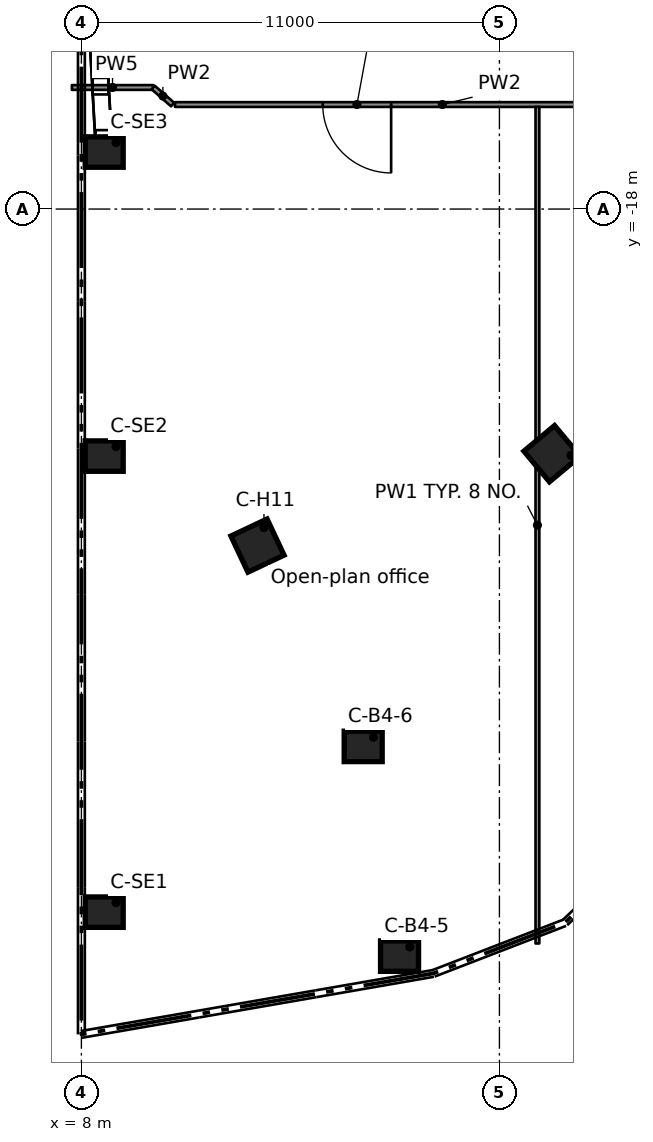
"""IFC4 building model, lengths in metres.
Left out: names, types, materials, properties, quantities, classifications, styles, units other than length and angle.
Written with IfcOpenShell. Run it as: python <this file> out.ifc"""

import sys

from ifc_helpers import new_model, si_unit, direction, frame, frame_2d, origin, origin_2d, place, context, subcontext, project, spatial, rectangle, extrude, element, fill, save


model = new_model("IFC4")
c1 = context("Model", 3, precision=1e-05, world=origin(), true_north=direction((0.0, 1.0)))
c2 = subcontext(c1, "Body", "Model", "MODEL_VIEW")
j1 = project(units=[si_unit("LENGTHUNIT", "METRE"), si_unit("PLANEANGLEUNIT", "RADIAN")], contexts=[c1])
p1 = place(None, origin())
s1 = spatial("IfcSite", under=j1, at=p1, CompositionType="ELEMENT")
p2 = place(p1, origin())
s2 = spatial("IfcBuilding", under=s1, at=p2, CompositionType="ELEMENT")
p3 = place(p2, frame((0.0, 0.0, 257.0)))
s3 = spatial("IfcBuildingStorey", under=s2, at=p3, CompositionType="ELEMENT", Elevation=257.0)
for number, where, z_axis, x_axis in (
    (1, (16.372, -37.657, 0.0), (0.0, 0.0, 1.0), (1.0, 0.0, 0.0)),
    (2, (15.415, -32.139, 0.0), (0.0, 0.0, 1.0), (1.0, 0.0, 0.0)),
):
    element("IfcColumn", number, at=place(p3, frame(where, z_axis=z_axis, x_axis=x_axis)), inside=s3, PredefinedType="COLUMN", context=c2, shape_type="SweptSolid", body=[
        extrude(rectangle(XDim=1.0, YDim=0.8, at=origin_2d()), origin(), (0.0, 0.0, 1.0), 3.5),
    ])
for number, where, z_axis, x_axis in (
    (3, (20.384, -24.437, 0.0), (0.0, 0.0, 1.0), (0.641, -0.768, 0.0)),
    (4, (12.634, -26.855, 0.0), (0.0, 0.0, 1.0), (0.426, -0.905, 0.0)),
):
    element("IfcColumn", number, at=place(p3, frame(where, z_axis=z_axis, x_axis=x_axis)), inside=s3, PredefinedType="COLUMN", context=c2, shape_type="SweptSolid", body=[
        extrude(rectangle(XDim=1.05, YDim=1.05, at=origin_2d()), origin(), (0.0, 0.0, 1.0), 3.5),
    ])
for number, where, z_axis, x_axis in (
    (5, (8.6, -36.5, 0.0), (0.0, 0.0, 1.0), (1.0, 0.0, 0.0)),
    (6, (8.6, -24.5, 0.0), (0.0, 0.0, 1.0), (1.0, 0.0, 0.0)),
    (7, (8.6, -16.5, 0.0), (0.0, 0.0, 1.0), (1.0, 0.0, 0.0)),
):
    element("IfcColumn", number, at=place(p3, frame(where, z_axis=z_axis, x_axis=x_axis)), inside=s3, PredefinedType="COLUMN", context=c2, shape_type="SweptSolid", body=[
        extrude(rectangle(XDim=1.0, YDim=0.8, at=origin_2d()), origin(), (0.0, 0.0, 1.0), 3.5),
    ])
p4 = place(p3, frame((22.189, -15.25, 0.0), z_axis=(0.0, 0.0, 1.0), x_axis=(-1.0, 0.0, 0.0)))
e8 = element("IfcWall", 8, at=p4, inside=s3, PredefinedType="PARTITIONING", context=c2, shape_type="SweptSolid", body=[
    extrude(rectangle(XDim=11.726, YDim=0.125, at=frame_2d((5.863, 0.0))), origin(), (0.0, 0.0, 1.0), 3.08),
])
p5 = place(p4, frame((6.039, 0.0, 0.0)))
e9 = element("IfcOpeningElement", 9, at=p5, cuts=e8, PredefinedType="OPENING", context=c2, shape_type="SweptSolid", body=[
    extrude(rectangle(XDim=1.8, YDim=2.1, at=frame_2d((0.9, 1.05))), frame((0.0, 0.073, 0.0), z_axis=(0.0, -1.0, 0.0), x_axis=(1.0, 0.0, 0.0)), (0.0, 0.0, 1.0), 0.145),
])
p6 = place(p3, frame((7.75, -14.801, 0.0), z_axis=(0.0, 0.0, 1.0), x_axis=(1.0, 0.0, 0.0)))
e10 = element("IfcWall", 10, at=p6, inside=s3, PredefinedType="PARTITIONING", context=c2, shape_type="SweptSolid", body=[
    extrude(rectangle(XDim=2.139, YDim=0.125, at=frame_2d((1.069, 0.0))), origin(), (0.0, 0.0, 1.0), 2.496),
])
p7 = place(p3, frame((20.0, -37.324, 0.0), z_axis=(0.0, 0.0, 1.0), x_axis=(0.0, 1.0, 0.0)))
e11 = element("IfcWall", 11, at=p7, inside=s3, PredefinedType="PARTITIONING", context=c2, shape_type="SweptSolid", body=[
    extrude(rectangle(XDim=22.012, YDim=0.1, at=frame_2d((11.006, 0.0))), origin(), (0.0, 0.0, 1.0), 3.08),
])
p8 = place(p3, frame((10.4, -15.25, 0.0), z_axis=(0.0, 0.0, 1.0), x_axis=(-0.751218826875, 0.660053235845, 0.0)))
e12 = element("IfcWall", 12, at=p8, inside=s3, PredefinedType="PARTITIONING", context=c2, shape_type="SweptSolid", body=[
    extrude(rectangle(XDim=0.68, YDim=0.125, at=frame_2d((0.34, 0.0))), origin(), (0.0, 0.0, 1.0), 3.08),
])
p9 = place(p5, origin())
e13 = element("IfcDoor", 13, at=p9, inside=s3, OperationType="DOUBLE_DOOR_SINGLE_SWING", PredefinedType="DOOR", context=c2, shape_type="SweptSolid", body=[
    extrude(rectangle(XDim=1.8, YDim=2.1, at=frame_2d((0.9, 1.05))), frame((0.0, 0.025, 0.0), z_axis=(0.0, -1.0, 0.0), x_axis=(1.0, 0.0, 0.0)), (0.0, 0.0, 1.0), 0.05),
])
fill(e9, e13)
save(model, sys.argv[1])
